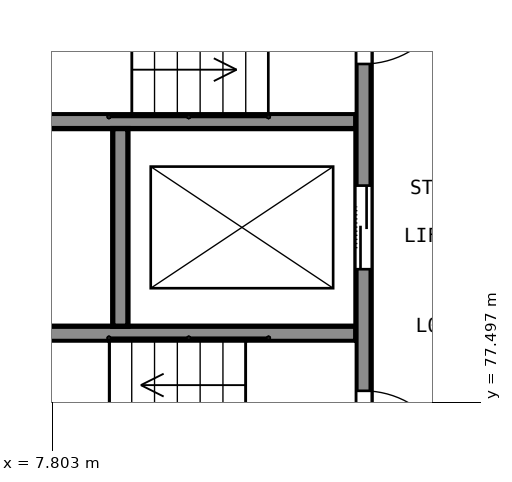
"""IFC4 building model, lengths in metres.
Left out: names, types, materials, properties, quantities, classifications, styles, units other than length and angle.
Written with IfcOpenShell. Run it as: python <this file> out.ifc"""

import sys

from ifc_helpers import new_model, si_unit, direction, frame, frame_2d, origin, place, context, subcontext, project, spatial, rectangle, extrude, element, fill, save


model = new_model("IFC4")
c1 = context("Model", 3, precision=1e-05, world=origin(), true_north=direction((0.0, 1.0)))
c2 = subcontext(c1, "Body", "Model", "MODEL_VIEW")
j1 = project(units=[si_unit("LENGTHUNIT", "METRE"), si_unit("PLANEANGLEUNIT", "RADIAN")], contexts=[c1])
p1 = place(None, origin())
s1 = spatial("IfcSite", under=j1, at=p1, CompositionType="ELEMENT")
p2 = place(p1, origin())
s2 = spatial("IfcBuilding", under=s1, at=p2, CompositionType="ELEMENT")
p3 = place(p2, origin())
s3 = spatial("IfcBuildingStorey", under=s2, at=p3, CompositionType="ELEMENT", Elevation=0.0)
p4 = place(p3, frame((11.9, 75.8, -1.8), z_axis=(0.0, 0.0, 1.0), x_axis=(0.0, 1.0, 0.0)))
e1 = element("IfcWall", 1, at=p4, inside=s3, PredefinedType="SHEAR", context=c2, shape_type="SweptSolid", body=[
    extrude(rectangle(XDim=8.0, YDim=0.2, at=frame_2d((4.0, 0.0))), origin(), (0.0, 0.0, 1.0), 7.3),
])
p5 = place(p4, frame((0.65, 0.0, 1.8)))
e2 = element("IfcOpeningElement", 2, at=p5, cuts=e1, PredefinedType="OPENING", context=c2, shape_type="SweptSolid", body=[
    extrude(rectangle(XDim=1.2, YDim=2.1, at=frame_2d((0.6, 1.05))), frame((0.0, 0.11, 0.0), z_axis=(0.0, -1.0, 0.0), x_axis=(1.0, 0.0, 0.0)), (0.0, 0.0, 1.0), 0.22),
])
p6 = place(p4, frame((6.15, 0.0, 1.8)))
e3 = element("IfcOpeningElement", 3, at=p6, cuts=e1, PredefinedType="OPENING", context=c2, shape_type="SweptSolid", body=[
    extrude(rectangle(XDim=1.2, YDim=2.1, at=frame_2d((0.6, 1.05))), frame((0.0, 0.11, 0.0), z_axis=(0.0, -1.0, 0.0), x_axis=(1.0, 0.0, 0.0)), (0.0, 0.0, 1.0), 0.22),
])
p7 = place(p4, frame((3.45, 0.0, 1.8)))
e4 = element("IfcOpeningElement", 4, at=p7, cuts=e1, PredefinedType="OPENING", context=c2, shape_type="SweptSolid", body=[
    extrude(rectangle(XDim=1.1, YDim=2.1, at=frame_2d((0.55, 1.05))), frame((0.0, 0.11, 0.0), z_axis=(0.0, -1.0, 0.0), x_axis=(1.0, 0.0, 0.0)), (0.0, 0.0, 1.0), 0.22),
])
for number, where, z_axis, x_axis in (
    (5, (6.2, 78.4, -1.8), (0.0, 0.0, 1.0), (1.0, 0.0, 0.0)),
    (6, (6.2, 81.2, -1.8), (0.0, 0.0, 1.0), (1.0, 0.0, 0.0)),
):
    element("IfcWall", number, at=place(p3, frame(where, z_axis=z_axis, x_axis=x_axis)), inside=s3, PredefinedType="SHEAR", context=c2, shape_type="SweptSolid", body=[
        extrude(rectangle(XDim=5.6, YDim=0.2, at=frame_2d((2.8, 0.0))), origin(), (0.0, 0.0, 1.0), 7.3),
    ])
p8 = place(p3, frame((8.7, 78.5, -1.8), z_axis=(0.0, 0.0, 1.0), x_axis=(0.0, 1.0, 0.0)))
e7 = element("IfcWall", 7, at=p8, inside=s3, PredefinedType="SHEAR", context=c2, shape_type="SweptSolid", body=[
    extrude(rectangle(XDim=2.6, YDim=0.2, at=frame_2d((1.3, 0.0))), origin(), (0.0, 0.0, 1.0), 7.3),
])
p9 = place(p5, origin())
e8 = element("IfcDoor", 8, at=p9, inside=s3, OperationType="SINGLE_SWING_LEFT", PredefinedType="DOOR", context=c2, shape_type="SweptSolid", body=[
    extrude(rectangle(XDim=1.2, YDim=2.1, at=frame_2d((0.6, 1.05))), frame((0.0, 0.025, 0.0), z_axis=(0.0, -1.0, 0.0), x_axis=(1.0, 0.0, 0.0)), (0.0, 0.0, 1.0), 0.05),
])
fill(e2, e8)
p10 = place(p6, origin())
e9 = element("IfcDoor", 9, at=p10, inside=s3, OperationType="SINGLE_SWING_RIGHT", PredefinedType="DOOR", context=c2, shape_type="SweptSolid", body=[
    extrude(rectangle(XDim=1.2, YDim=2.1, at=frame_2d((0.6, 1.05))), frame((0.0, 0.025, 0.0), z_axis=(0.0, -1.0, 0.0), x_axis=(1.0, 0.0, 0.0)), (0.0, 0.0, 1.0), 0.05),
])
fill(e3, e9)
p11 = place(p7, origin())
e10 = element("IfcDoor", 10, at=p11, inside=s3, OperationType="DOUBLE_DOOR_SLIDING", PredefinedType="DOOR", context=c2, shape_type="SweptSolid", body=[
    extrude(rectangle(XDim=1.1, YDim=2.1, at=frame_2d((0.55, 1.05))), frame((0.0, 0.025, 0.0), z_axis=(0.0, -1.0, 0.0), x_axis=(1.0, 0.0, 0.0)), (0.0, 0.0, 1.0), 0.05),
])
fill(e4, e10)
save(model, sys.argv[1])
